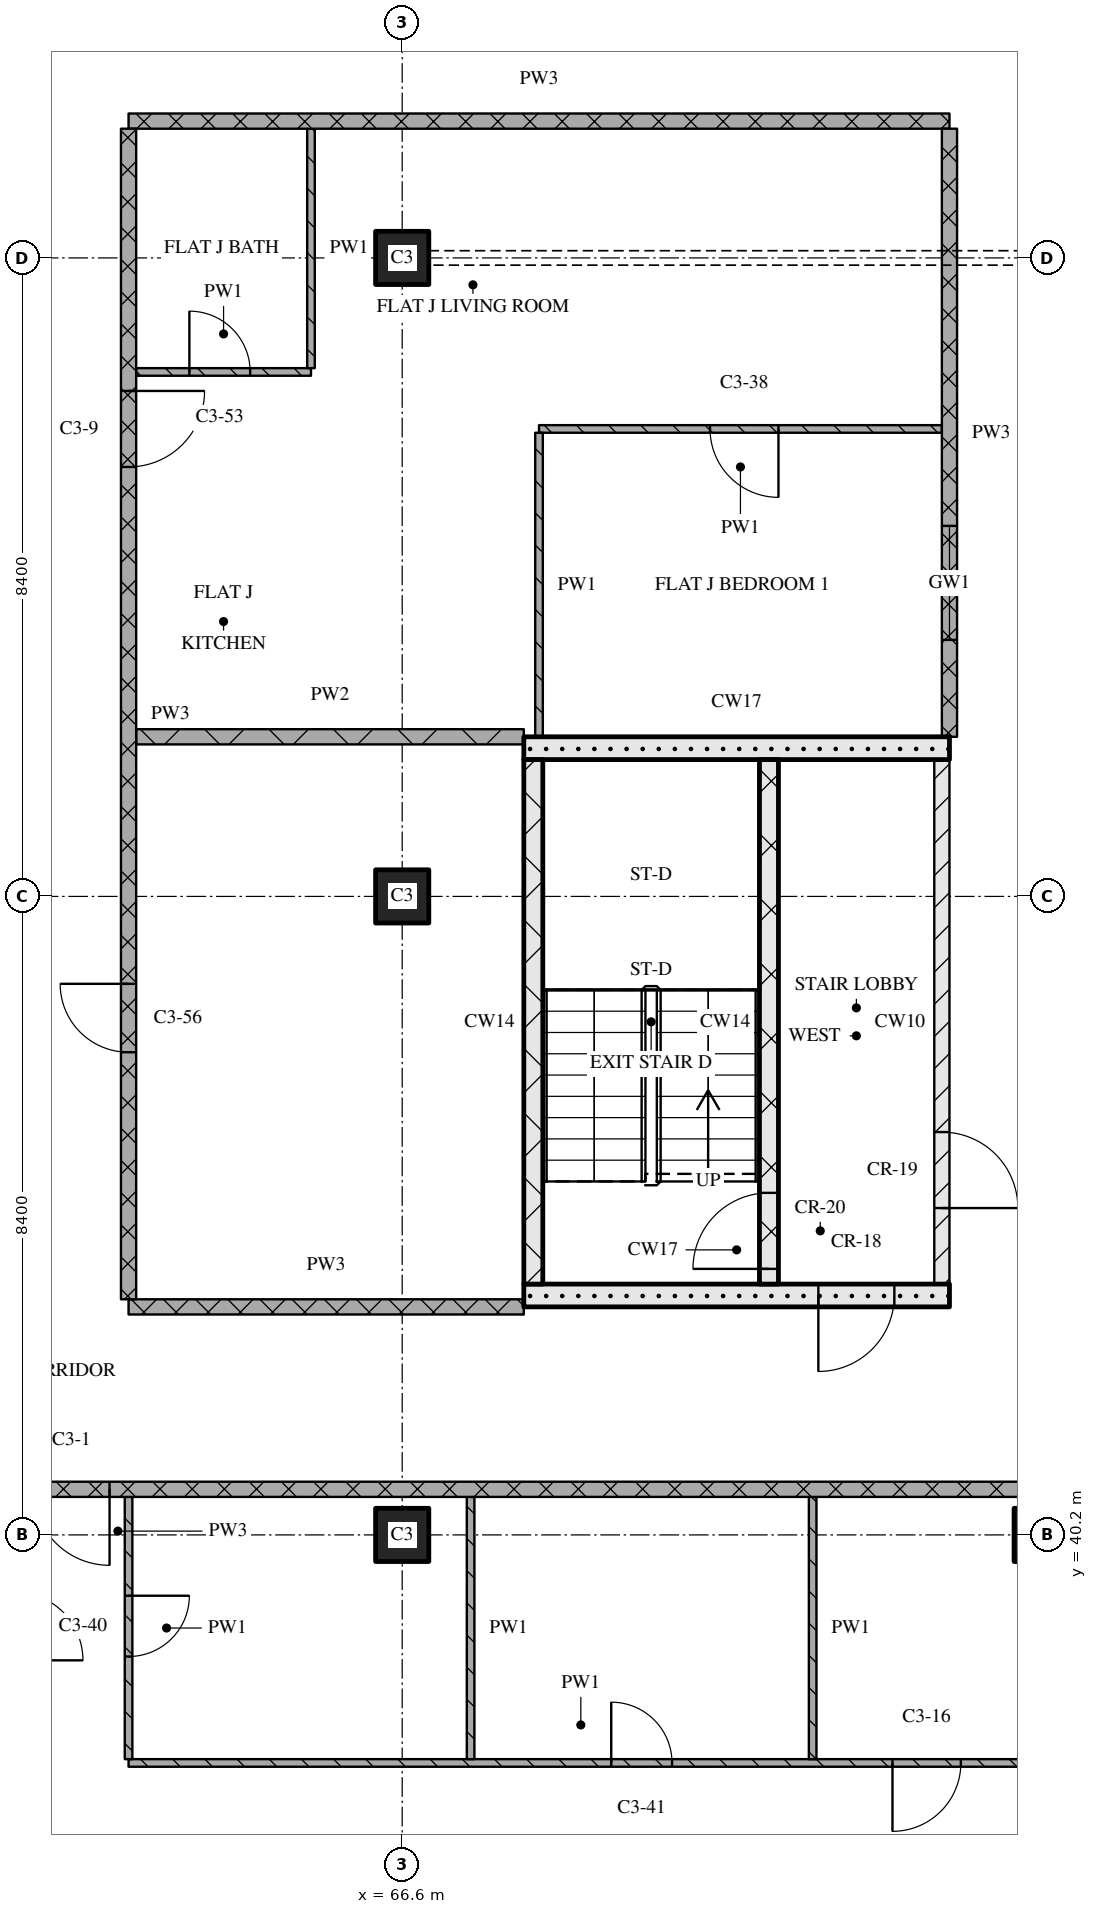
"""IFC4 building model, lengths in metres.
Left out: names, types, materials, properties, quantities, classifications, styles, units other than length and angle.
Written with IfcOpenShell. Run it as: python <this file> out.ifc"""

import sys

from ifc_helpers import new_model, si_unit, direction, frame, frame_2d, origin, origin_2d, place, context, subcontext, project, spatial, rectangle, extrude, element, fill, save


model = new_model("IFC4")
c1 = context("Model", 3, precision=1e-05, world=origin(), true_north=direction((0.0, 1.0)))
c2 = subcontext(c1, "Body", "Model", "MODEL_VIEW")
j1 = project(units=[si_unit("LENGTHUNIT", "METRE"), si_unit("PLANEANGLEUNIT", "RADIAN")], contexts=[c1])
p1 = place(None, origin())
s1 = spatial("IfcSite", under=j1, at=p1, CompositionType="ELEMENT")
p2 = place(p1, origin())
s2 = spatial("IfcBuilding", under=s1, at=p2, CompositionType="ELEMENT")
p3 = place(p2, frame((0.0, 0.0, 172.65)))
s3 = spatial("IfcBuildingStorey", under=s2, at=p3, CompositionType="ELEMENT", Elevation=172.65)
for number, where, z_axis, x_axis in (
    (1, (66.6, 40.2, 0.0), (0.0, 0.0, 1.0), (1.0, 0.0, 0.0)),
    (2, (66.6, 48.6, 0.0), (0.0, 0.0, 1.0), (1.0, 0.0, 0.0)),
    (3, (66.6, 57.0, 0.0), (0.0, 0.0, 1.0), (1.0, 0.0, 0.0)),
    (4, (75.0, 40.2, 0.0), (0.0, 0.0, 1.0), (1.0, 0.0, 0.0)),
):
    element("IfcColumn", number, at=place(p3, frame(where, z_axis=z_axis, x_axis=x_axis)), inside=s3, PredefinedType="COLUMN", context=c2, shape_type="SweptSolid", body=[
        extrude(rectangle(XDim=0.7, YDim=0.7, at=origin_2d()), origin(), (0.0, 0.0, 1.0), 3.6),
    ])
p4 = place(p3, frame((68.2, 43.35, 0.0), z_axis=(0.0, 0.0, 1.0), x_axis=(1.0, 0.0, 0.0)))
e5 = element("IfcWall", 5, at=p4, inside=s3, PredefinedType="SOLIDWALL", context=c2, shape_type="SweptSolid", body=[
    extrude(rectangle(XDim=5.6, YDim=0.3, at=frame_2d((2.8, 0.0))), origin(), (0.0, 0.0, 1.0), 3.32),
])
p5 = place(p4, frame((3.875, 0.0, 0.0)))
e6 = element("IfcOpeningElement", 6, at=p5, cuts=e5, PredefinedType="OPENING", context=c2, shape_type="SweptSolid", body=[
    extrude(rectangle(XDim=1.0, YDim=2.1, at=frame_2d((0.5, 1.05))), frame((0.0, 0.16, 0.0), z_axis=(0.0, -1.0, 0.0), x_axis=(1.0, 0.0, 0.0)), (0.0, 0.0, 1.0), 0.32),
])
p6 = place(p3, frame((68.325, 43.5, 0.0), z_axis=(0.0, 0.0, 1.0), x_axis=(0.0, 1.0, 0.0)))
e7 = element("IfcWall", 7, at=p6, inside=s3, PredefinedType="SOLIDWALL", context=c2, shape_type="SweptSolid", body=[
    extrude(rectangle(XDim=6.9, YDim=0.25, at=frame_2d((3.45, 0.0))), origin(), (0.0, 0.0, 1.0), 3.32),
])
p7 = place(p3, frame((71.425, 43.5, 0.0), z_axis=(0.0, 0.0, 1.0), x_axis=(0.0, 1.0, 0.0)))
e8 = element("IfcWall", 8, at=p7, inside=s3, PredefinedType="SOLIDWALL", context=c2, shape_type="SweptSolid", body=[
    extrude(rectangle(XDim=6.9, YDim=0.25, at=frame_2d((3.45, 0.0))), origin(), (0.0, 0.0, 1.0), 3.32),
])
p8 = place(p7, frame((0.2, 0.0, 0.0)))
e9 = element("IfcOpeningElement", 9, at=p8, cuts=e8, PredefinedType="OPENING", context=c2, shape_type="SweptSolid", body=[
    extrude(rectangle(XDim=1.0, YDim=2.1, at=frame_2d((0.5, 1.05))), frame((0.0, 0.135, 0.0), z_axis=(0.0, -1.0, 0.0), x_axis=(1.0, 0.0, 0.0)), (0.0, 0.0, 1.0), 0.27),
])
p9 = place(p3, frame((73.7, 43.5, 0.0), z_axis=(0.0, 0.0, 1.0), x_axis=(0.0, 1.0, 0.0)))
e10 = element("IfcWall", 10, at=p9, inside=s3, PredefinedType="PARTITIONING", context=c2, shape_type="SweptSolid", body=[
    extrude(rectangle(XDim=6.9, YDim=0.2, at=frame_2d((3.45, 0.0))), origin(), (0.0, 0.0, 1.0), 3.32),
])
p10 = place(p9, frame((1.0, 0.0, 0.0)))
e11 = element("IfcOpeningElement", 11, at=p10, cuts=e10, PredefinedType="OPENING", context=c2, shape_type="SweptSolid", body=[
    extrude(rectangle(XDim=1.0, YDim=2.1, at=frame_2d((0.5, 1.05))), frame((0.0, 0.11, 0.0), z_axis=(0.0, -1.0, 0.0), x_axis=(1.0, 0.0, 0.0)), (0.0, 0.0, 1.0), 0.22),
])
p11 = place(p3, frame((68.2, 50.55, 0.0), z_axis=(0.0, 0.0, 1.0), x_axis=(1.0, 0.0, 0.0)))
e12 = element("IfcWall", 12, at=p11, inside=s3, PredefinedType="SOLIDWALL", context=c2, shape_type="SweptSolid", body=[
    extrude(rectangle(XDim=5.6, YDim=0.3, at=frame_2d((2.8, 0.0))), origin(), (0.0, 0.0, 1.0), 3.32),
])
p12 = place(p3, frame((63.0, 37.2, 0.0), z_axis=(0.0, 0.0, 1.0), x_axis=(1.0, 0.0, 0.0)))
e13 = element("IfcWall", 13, at=p12, inside=s3, PredefinedType="PARTITIONING", context=c2, shape_type="SweptSolid", body=[
    extrude(rectangle(XDim=11.9, YDim=0.1, at=frame_2d((5.95, 0.0))), origin(), (0.0, 0.0, 1.0), 3.32),
])
p13 = place(p12, frame((6.35, 0.0, 0.0)))
e14 = element("IfcOpeningElement", 14, at=p13, cuts=e13, PredefinedType="OPENING", context=c2, shape_type="SweptSolid", body=[
    extrude(rectangle(XDim=0.8, YDim=2.1, at=frame_2d((0.4, 1.05))), frame((0.0, 0.06, 0.0), z_axis=(0.0, -1.0, 0.0), x_axis=(1.0, 0.0, 0.0)), (0.0, 0.0, 1.0), 0.12),
])
p14 = place(p12, frame((10.05, 0.0, 0.0)))
e15 = element("IfcOpeningElement", 15, at=p14, cuts=e13, PredefinedType="OPENING", context=c2, shape_type="SweptSolid", body=[
    extrude(rectangle(XDim=0.9, YDim=2.1, at=frame_2d((0.45, 1.05))), frame((0.0, 0.06, 0.0), z_axis=(0.0, -1.0, 0.0), x_axis=(1.0, 0.0, 0.0)), (0.0, 0.0, 1.0), 0.12),
])
p15 = place(p3, frame((75.0, 40.8, 0.0), z_axis=(0.0, 0.0, 1.0), x_axis=(-1.0, 0.0, 0.0)))
e16 = element("IfcWall", 16, at=p15, inside=s3, PredefinedType="PARTITIONING", context=c2, shape_type="SweptSolid", body=[
    extrude(rectangle(XDim=24.28, YDim=0.2, at=frame_2d((12.14, 0.0))), origin(), (0.0, 0.0, 1.0), 3.32),
])
p16 = place(p15, frame((12.25, 0.0, 0.0)))
e17 = element("IfcOpeningElement", 17, at=p16, cuts=e16, PredefinedType="OPENING", context=c2, shape_type="SweptSolid", body=[
    extrude(rectangle(XDim=1.0, YDim=2.1, at=frame_2d((0.5, 1.05))), frame((0.0, 0.11, 0.0), z_axis=(0.0, -1.0, 0.0), x_axis=(1.0, 0.0, 0.0)), (0.0, 0.0, 1.0), 0.22),
])
p17 = place(p3, frame((63.0, 43.2, 0.0), z_axis=(0.0, 0.0, 1.0), x_axis=(1.0, 0.0, 0.0)))
e18 = element("IfcWall", 18, at=p17, inside=s3, PredefinedType="PARTITIONING", context=c2, shape_type="SweptSolid", body=[
    extrude(rectangle(XDim=5.2, YDim=0.2, at=frame_2d((2.6, 0.0))), origin(), (0.0, 0.0, 1.0), 3.32),
])
p18 = place(p3, frame((63.1, 50.7, 0.0), z_axis=(0.0, 0.0, 1.0), x_axis=(1.0, 0.0, 0.0)))
e19 = element("IfcWall", 19, at=p18, inside=s3, PredefinedType="PARTITIONING", context=c2, shape_type="SweptSolid", body=[
    extrude(rectangle(XDim=5.1, YDim=0.2, at=frame_2d((2.55, 0.0))), origin(), (0.0, 0.0, 1.0), 3.32),
])
p19 = place(p3, frame((73.7, 54.75, 0.0), z_axis=(0.0, 0.0, 1.0), x_axis=(-1.0, 0.0, 0.0)))
e20 = element("IfcWall", 20, at=p19, inside=s3, PredefinedType="PARTITIONING", context=c2, shape_type="SweptSolid", body=[
    extrude(rectangle(XDim=5.3, YDim=0.1, at=frame_2d((2.65, 0.0))), origin(), (0.0, 0.0, 1.0), 3.32),
])
p20 = place(p19, frame((2.15, 0.0, 0.0)))
e21 = element("IfcOpeningElement", 21, at=p20, cuts=e20, PredefinedType="OPENING", context=c2, shape_type="SweptSolid", body=[
    extrude(rectangle(XDim=0.9, YDim=2.1, at=frame_2d((0.45, 1.05))), frame((0.0, 0.06, 0.0), z_axis=(0.0, -1.0, 0.0), x_axis=(1.0, 0.0, 0.0)), (0.0, 0.0, 1.0), 0.12),
])
p21 = place(p3, frame((63.1, 55.5, 0.0), z_axis=(0.0, 0.0, 1.0), x_axis=(1.0, 0.0, 0.0)))
e22 = element("IfcWall", 22, at=p21, inside=s3, PredefinedType="PARTITIONING", context=c2, shape_type="SweptSolid", body=[
    extrude(rectangle(XDim=2.3, YDim=0.1, at=frame_2d((1.15, 0.0))), origin(), (0.0, 0.0, 1.0), 3.32),
])
p22 = place(p21, frame((0.7, 0.0, 0.0)))
e23 = element("IfcOpeningElement", 23, at=p22, cuts=e22, PredefinedType="OPENING", context=c2, shape_type="SweptSolid", body=[
    extrude(rectangle(XDim=0.8, YDim=2.1, at=frame_2d((0.4, 1.05))), frame((0.0, 0.06, 0.0), z_axis=(0.0, -1.0, 0.0), x_axis=(1.0, 0.0, 0.0)), (0.0, 0.0, 1.0), 0.12),
])
p23 = place(p3, frame((63.0, 58.8, 0.0), z_axis=(0.0, 0.0, 1.0), x_axis=(1.0, 0.0, 0.0)))
e24 = element("IfcWall", 24, at=p23, inside=s3, PredefinedType="PARTITIONING", context=c2, shape_type="SweptSolid", body=[
    extrude(rectangle(XDim=10.8, YDim=0.2, at=frame_2d((5.4, 0.0))), origin(), (0.0, 0.0, 1.0), 3.32),
])
p24 = place(p3, frame((63.0, 58.7, 0.0), z_axis=(0.0, 0.0, 1.0), x_axis=(0.0, -1.0, 0.0)))
e25 = element("IfcWall", 25, at=p24, inside=s3, PredefinedType="PARTITIONING", context=c2, shape_type="SweptSolid", body=[
    extrude(rectangle(XDim=15.4, YDim=0.2, at=frame_2d((7.7, 0.0))), origin(), (0.0, 0.0, 1.0), 3.32),
])
p25 = place(p24, frame((3.45, 0.0, 0.0)))
e26 = element("IfcOpeningElement", 26, at=p25, cuts=e25, PredefinedType="OPENING", context=c2, shape_type="SweptSolid", body=[
    extrude(rectangle(XDim=1.0, YDim=2.1, at=frame_2d((0.5, 1.05))), frame((0.0, 0.11, 0.0), z_axis=(0.0, -1.0, 0.0), x_axis=(1.0, 0.0, 0.0)), (0.0, 0.0, 1.0), 0.22),
])
p26 = place(p24, frame((11.25, 0.0, 0.0)))
e27 = element("IfcOpeningElement", 27, at=p26, cuts=e25, PredefinedType="OPENING", context=c2, shape_type="SweptSolid", body=[
    extrude(rectangle(XDim=0.9, YDim=2.1, at=frame_2d((0.45, 1.05))), frame((0.0, 0.11, 0.0), z_axis=(0.0, -1.0, 0.0), x_axis=(1.0, 0.0, 0.0)), (0.0, 0.0, 1.0), 0.22),
])
p27 = place(p3, frame((63.0, 40.7, 0.0), z_axis=(0.0, 0.0, 1.0), x_axis=(0.0, -1.0, 0.0)))
e28 = element("IfcWall", 28, at=p27, inside=s3, PredefinedType="PARTITIONING", context=c2, shape_type="SweptSolid", body=[
    extrude(rectangle(XDim=3.45, YDim=0.1, at=frame_2d((1.725, 0.0))), origin(), (0.0, 0.0, 1.0), 3.32),
])
p28 = place(p27, frame((1.3, 0.0, 0.0)))
e29 = element("IfcOpeningElement", 29, at=p28, cuts=e28, PredefinedType="OPENING", context=c2, shape_type="SweptSolid", body=[
    extrude(rectangle(XDim=0.8, YDim=2.1, at=frame_2d((0.4, 1.05))), frame((0.0, 0.06, 0.0), z_axis=(0.0, -1.0, 0.0), x_axis=(1.0, 0.0, 0.0)), (0.0, 0.0, 1.0), 0.12),
])
p29 = place(p3, frame((65.4, 58.7, 0.0), z_axis=(0.0, 0.0, 1.0), x_axis=(0.0, -1.0, 0.0)))
e30 = element("IfcWall", 30, at=p29, inside=s3, PredefinedType="PARTITIONING", context=c2, shape_type="SweptSolid", body=[
    extrude(rectangle(XDim=3.15, YDim=0.1, at=frame_2d((1.575, 0.0))), origin(), (0.0, 0.0, 1.0), 3.32),
])
p30 = place(p3, frame((67.5, 40.7, 0.0), z_axis=(0.0, 0.0, 1.0), x_axis=(0.0, -1.0, 0.0)))
e31 = element("IfcWall", 31, at=p30, inside=s3, PredefinedType="PARTITIONING", context=c2, shape_type="SweptSolid", body=[
    extrude(rectangle(XDim=3.45, YDim=0.1, at=frame_2d((1.725, 0.0))), origin(), (0.0, 0.0, 1.0), 3.32),
])
p31 = place(p3, frame((68.4, 54.7, 0.0), z_axis=(0.0, 0.0, 1.0), x_axis=(0.0, -1.0, 0.0)))
e32 = element("IfcWall", 32, at=p31, inside=s3, PredefinedType="PARTITIONING", context=c2, shape_type="SweptSolid", body=[
    extrude(rectangle(XDim=4.0, YDim=0.1, at=frame_2d((2.0, 0.0))), origin(), (0.0, 0.0, 1.0), 3.32),
])
p32 = place(p3, frame((72.0, 40.7, 0.0), z_axis=(0.0, 0.0, 1.0), x_axis=(0.0, -1.0, 0.0)))
e33 = element("IfcWall", 33, at=p32, inside=s3, PredefinedType="PARTITIONING", context=c2, shape_type="SweptSolid", body=[
    extrude(rectangle(XDim=3.45, YDim=0.1, at=frame_2d((1.725, 0.0))), origin(), (0.0, 0.0, 1.0), 3.32),
])
p33 = place(p3, frame((73.8, 58.7, 0.0), z_axis=(0.0, 0.0, 1.0), x_axis=(0.0, -1.0, 0.0)))
e34 = element("IfcWall", 34, at=p33, inside=s3, PredefinedType="PARTITIONING", context=c2, shape_type="SweptSolid", body=[
    extrude(rectangle(XDim=8.0, YDim=0.2, at=frame_2d((4.0, 0.0))), origin(), (0.0, 0.0, 1.0), 3.32),
])
p34 = place(p33, frame((5.225, 0.0, 0.9)))
e35 = element("IfcOpeningElement", 35, at=p34, cuts=e34, PredefinedType="OPENING", context=c2, shape_type="SweptSolid", body=[
    extrude(rectangle(XDim=1.5, YDim=1.5, at=frame_2d((0.75, 0.75))), frame((0.0, 0.11, 0.0), z_axis=(0.0, -1.0, 0.0), x_axis=(1.0, 0.0, 0.0)), (0.0, 0.0, 1.0), 0.22),
])
p35 = place(p5, origin())
e36 = element("IfcDoor", 36, at=p35, inside=s3, OperationType="SINGLE_SWING_RIGHT", PredefinedType="DOOR", context=c2, shape_type="SweptSolid", body=[
    extrude(rectangle(XDim=1.0, YDim=2.1, at=frame_2d((0.5, 1.05))), frame((0.0, 0.025, 0.0), z_axis=(0.0, -1.0, 0.0), x_axis=(1.0, 0.0, 0.0)), (0.0, 0.0, 1.0), 0.05),
])
fill(e6, e36)
p36 = place(p8, origin())
e37 = element("IfcDoor", 37, at=p36, inside=s3, OperationType="SINGLE_SWING_LEFT", PredefinedType="DOOR", context=c2, shape_type="SweptSolid", body=[
    extrude(rectangle(XDim=1.0, YDim=2.1, at=frame_2d((0.5, 1.05))), frame((0.0, 0.025, 0.0), z_axis=(0.0, -1.0, 0.0), x_axis=(1.0, 0.0, 0.0)), (0.0, 0.0, 1.0), 0.05),
])
fill(e9, e37)
p37 = place(p10, origin())
e38 = element("IfcDoor", 38, at=p37, inside=s3, OperationType="SINGLE_SWING_RIGHT", PredefinedType="DOOR", context=c2, shape_type="SweptSolid", body=[
    extrude(rectangle(XDim=1.0, YDim=2.1, at=frame_2d((0.5, 1.05))), frame((0.0, 0.025, 0.0), z_axis=(0.0, -1.0, 0.0), x_axis=(1.0, 0.0, 0.0)), (0.0, 0.0, 1.0), 0.05),
])
fill(e11, e38)
p38 = place(p13, origin())
e39 = element("IfcDoor", 39, at=p38, inside=s3, OperationType="SINGLE_SWING_LEFT", PredefinedType="DOOR", context=c2, shape_type="SweptSolid", body=[
    extrude(rectangle(XDim=0.8, YDim=2.1, at=frame_2d((0.4, 1.05))), frame((0.0, 0.025, 0.0), z_axis=(0.0, -1.0, 0.0), x_axis=(1.0, 0.0, 0.0)), (0.0, 0.0, 1.0), 0.05),
])
fill(e14, e39)
p39 = place(p14, origin())
e40 = element("IfcDoor", 40, at=p39, inside=s3, OperationType="SINGLE_SWING_RIGHT", PredefinedType="DOOR", context=c2, shape_type="SweptSolid", body=[
    extrude(rectangle(XDim=0.9, YDim=2.1, at=frame_2d((0.45, 1.05))), frame((0.0, 0.025, 0.0), z_axis=(0.0, -1.0, 0.0), x_axis=(1.0, 0.0, 0.0)), (0.0, 0.0, 1.0), 0.05),
])
fill(e15, e40)
p40 = place(p16, origin())
e41 = element("IfcDoor", 41, at=p40, inside=s3, OperationType="SINGLE_SWING_LEFT", PredefinedType="DOOR", context=c2, shape_type="SweptSolid", body=[
    extrude(rectangle(XDim=1.0, YDim=2.1, at=frame_2d((0.5, 1.05))), frame((0.0, 0.025, 0.0), z_axis=(0.0, -1.0, 0.0), x_axis=(1.0, 0.0, 0.0)), (0.0, 0.0, 1.0), 0.05),
])
fill(e17, e41)
p41 = place(p20, origin())
e42 = element("IfcDoor", 42, at=p41, inside=s3, OperationType="SINGLE_SWING_LEFT", PredefinedType="DOOR", context=c2, shape_type="SweptSolid", body=[
    extrude(rectangle(XDim=0.9, YDim=2.1, at=frame_2d((0.45, 1.05))), frame((0.0, 0.025, 0.0), z_axis=(0.0, -1.0, 0.0), x_axis=(1.0, 0.0, 0.0)), (0.0, 0.0, 1.0), 0.05),
])
fill(e21, e42)
p42 = place(p22, origin())
e43 = element("IfcDoor", 43, at=p42, inside=s3, OperationType="SINGLE_SWING_LEFT", PredefinedType="DOOR", context=c2, shape_type="SweptSolid", body=[
    extrude(rectangle(XDim=0.8, YDim=2.1, at=frame_2d((0.4, 1.05))), frame((0.0, 0.025, 0.0), z_axis=(0.0, -1.0, 0.0), x_axis=(1.0, 0.0, 0.0)), (0.0, 0.0, 1.0), 0.05),
])
fill(e23, e43)
p43 = place(p25, origin())
e44 = element("IfcDoor", 44, at=p43, inside=s3, OperationType="SINGLE_SWING_LEFT", PredefinedType="DOOR", context=c2, shape_type="SweptSolid", body=[
    extrude(rectangle(XDim=1.0, YDim=2.1, at=frame_2d((0.5, 1.05))), frame((0.0, 0.025, 0.0), z_axis=(0.0, -1.0, 0.0), x_axis=(1.0, 0.0, 0.0)), (0.0, 0.0, 1.0), 0.05),
])
fill(e26, e44)
p44 = place(p26, origin())
e45 = element("IfcDoor", 45, at=p44, inside=s3, OperationType="SINGLE_SWING_RIGHT", PredefinedType="DOOR", context=c2, shape_type="SweptSolid", body=[
    extrude(rectangle(XDim=0.9, YDim=2.1, at=frame_2d((0.45, 1.05))), frame((0.0, 0.025, 0.0), z_axis=(0.0, -1.0, 0.0), x_axis=(1.0, 0.0, 0.0)), (0.0, 0.0, 1.0), 0.05),
])
fill(e27, e45)
p45 = place(p28, origin())
e46 = element("IfcDoor", 46, at=p45, inside=s3, OperationType="SINGLE_SWING_LEFT", PredefinedType="DOOR", context=c2, shape_type="SweptSolid", body=[
    extrude(rectangle(XDim=0.8, YDim=2.1, at=frame_2d((0.4, 1.05))), frame((0.0, 0.025, 0.0), z_axis=(0.0, -1.0, 0.0), x_axis=(1.0, 0.0, 0.0)), (0.0, 0.0, 1.0), 0.05),
])
fill(e29, e46)
p46 = place(p34, origin())
e47 = element("IfcWindow", 47, at=p46, inside=s3, PartitioningType="SINGLE_PANEL", PredefinedType="WINDOW", context=c2, shape_type="SweptSolid", body=[
    extrude(rectangle(XDim=1.5, YDim=1.5, at=frame_2d((0.75, 0.75))), frame((0.0, 0.03, 0.0), z_axis=(0.0, -1.0, 0.0), x_axis=(1.0, 0.0, 0.0)), (0.0, 0.0, 1.0), 0.06),
])
fill(e35, e47)
save(model, sys.argv[1])
